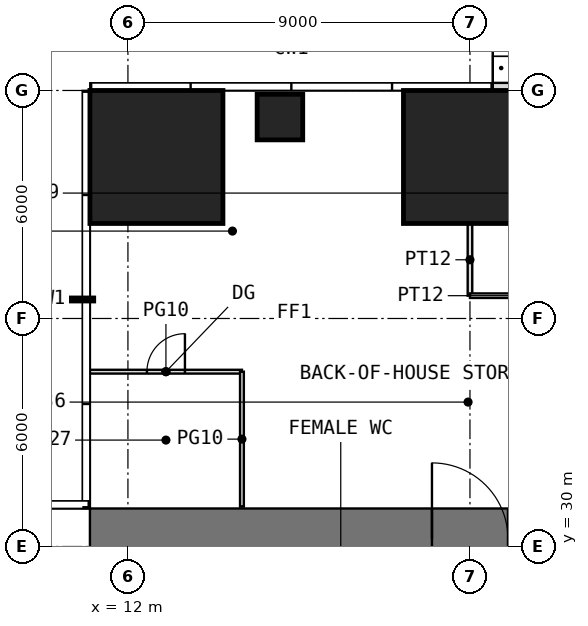
"""IFC4 building model, lengths in metres.
Left out: names, types, materials, properties, quantities, classifications, styles, units other than length and angle.
Written with IfcOpenShell. Run it as: python <this file> out.ifc"""

import sys

from ifc_helpers import new_model, si_unit, direction, frame, frame_2d, origin, origin_2d, place, context, subcontext, project, spatial, rectangle, extrude, element, fill, save


model = new_model("IFC4")
c1 = context("Model", 3, precision=1e-05, world=origin(), true_north=direction((0.0, 1.0)))
c2 = subcontext(c1, "Body", "Model", "MODEL_VIEW")
j1 = project(units=[si_unit("LENGTHUNIT", "METRE"), si_unit("PLANEANGLEUNIT", "RADIAN")], contexts=[c1])
p1 = place(None, origin())
s1 = spatial("IfcSite", under=j1, at=p1, CompositionType="ELEMENT")
p2 = place(p1, origin())
s2 = spatial("IfcBuilding", under=s1, at=p2, CompositionType="ELEMENT")
p3 = place(p2, frame((0.0, 0.0, 96.5)))
s3 = spatial("IfcBuildingStorey", under=s2, at=p3, CompositionType="ELEMENT", Elevation=96.5)
p4 = place(p3, frame((12.75, 40.25, 0.0), z_axis=(0.0, 0.0, 1.0), x_axis=(1.0, 0.0, 0.0)))
e1 = element("IfcColumn", 1, at=p4, inside=s3, PredefinedType="COLUMN", context=c2, shape_type="SweptSolid", body=[
    extrude(rectangle(XDim=3.5, YDim=3.5, at=origin_2d()), origin(), (0.0, 0.0, 1.0), 4.0),
])
p5 = place(p3, frame((16.0, 41.3, 0.0), z_axis=(0.0, 0.0, 1.0), x_axis=(1.0, 0.0, 0.0)))
e2 = element("IfcColumn", 2, at=p5, inside=s3, PredefinedType="COLUMN", context=c2, shape_type="SweptSolid", body=[
    extrude(rectangle(XDim=1.2, YDim=1.2, at=origin_2d()), origin(), (0.0, 0.0, 1.0), 4.0),
])
p6 = place(p3, frame((21.0, 40.25, 0.0), z_axis=(0.0, 0.0, 1.0), x_axis=(1.0, 0.0, 0.0)))
e3 = element("IfcColumn", 3, at=p6, inside=s3, PredefinedType="COLUMN", context=c2, shape_type="SweptSolid", body=[
    extrude(rectangle(XDim=3.5, YDim=3.5, at=origin_2d()), origin(), (0.0, 0.0, 1.0), 4.0),
])
p7 = place(p3, frame((25.4, 42.1, 0.0), z_axis=(0.0, 0.0, 1.0), x_axis=(-1.0, 0.0, 0.0)))
e4 = element("IfcWall", 4, at=p7, inside=s3, PredefinedType="USERDEFINED", context=c2, shape_type="SweptSolid", body=[
    extrude(rectangle(XDim=3.8, YDim=0.2, at=frame_2d((1.9, 0.0))), origin(), (0.0, 0.0, 1.0), 3.75),
])
p8 = place(p7, frame((1.5, 0.0, 0.0)))
e5 = element("IfcOpeningElement", 5, at=p8, cuts=e4, PredefinedType="OPENING", context=c2, shape_type="SweptSolid", body=[
    extrude(rectangle(XDim=1.0, YDim=2.4, at=frame_2d((0.5, 1.2))), frame((0.0, 0.11, 0.0), z_axis=(0.0, -1.0, 0.0), x_axis=(1.0, 0.0, 0.0)), (0.0, 0.0, 1.0), 0.22),
])
p9 = place(p3, frame((11.0, 30.2, -0.05), z_axis=(0.0, 0.0, 1.0), x_axis=(1.0, 0.0, 0.0)))
e6 = element("IfcWall", 6, at=p9, inside=s3, PredefinedType="SHEAR", context=c2, shape_type="SweptSolid", body=[
    extrude(rectangle(XDim=20.0, YDim=1.6, at=frame_2d((10.0, 0.0))), origin(), (0.0, 0.0, 1.0), 4.0),
])
p10 = place(p9, frame((9.0, 0.0, 0.05)))
e7 = element("IfcOpeningElement", 7, at=p10, cuts=e6, PredefinedType="OPENING", context=c2, shape_type="SweptSolid", body=[
    extrude(rectangle(XDim=2.0, YDim=2.2, at=frame_2d((1.0, 1.1))), frame((0.0, 0.81, 0.0), z_axis=(0.0, -1.0, 0.0), x_axis=(1.0, 0.0, 0.0)), (0.0, 0.0, 1.0), 1.62),
])
p11 = place(p3, frame((11.0, 34.6, 0.0), z_axis=(0.0, 0.0, 1.0), x_axis=(1.0, 0.0, 0.0)))
e8 = element("IfcWall", 8, at=p11, inside=s3, PredefinedType="PARTITIONING", context=c2, shape_type="SweptSolid", body=[
    extrude(rectangle(XDim=4.0, YDim=0.1, at=frame_2d((2.0, 0.0))), origin(), (0.0, 0.0, 1.0), 3.75),
])
p12 = place(p11, frame((1.5, 0.0, 0.0)))
e9 = element("IfcOpeningElement", 9, at=p12, cuts=e8, PredefinedType="OPENING", context=c2, shape_type="SweptSolid", body=[
    extrude(rectangle(XDim=1.0, YDim=2.4, at=frame_2d((0.5, 1.2))), frame((0.0, 0.06, 0.0), z_axis=(0.0, -1.0, 0.0), x_axis=(1.0, 0.0, 0.0)), (0.0, 0.0, 1.0), 0.12),
])
p13 = place(p3, frame((15.0, 31.05, 0.0), z_axis=(0.0, 0.0, 1.0), x_axis=(0.0, 1.0, 0.0)))
e10 = element("IfcWall", 10, at=p13, inside=s3, PredefinedType="PARTITIONING", context=c2, shape_type="SweptSolid", body=[
    extrude(rectangle(XDim=3.55, YDim=0.1, at=frame_2d((1.775, 0.0))), origin(), (0.0, 0.0, 1.0), 3.75),
])
p14 = place(p3, frame((21.0, 36.6, 0.0), z_axis=(0.0, 0.0, 1.0), x_axis=(0.0, 1.0, 0.0)))
e11 = element("IfcWall", 11, at=p14, inside=s3, PredefinedType="PARTITIONING", context=c2, shape_type="SweptSolid", body=[
    extrude(rectangle(XDim=1.89, YDim=0.12, at=frame_2d((0.945, 0.0))), origin(), (0.0, 0.0, 1.0), 3.75),
])
p15 = place(p3, frame((21.0, 36.6, 0.0), z_axis=(0.0, 0.0, 1.0), x_axis=(1.0, 0.0, 0.0)))
e12 = element("IfcWall", 12, at=p15, inside=s3, PredefinedType="PARTITIONING", context=c2, shape_type="SweptSolid", body=[
    extrude(rectangle(XDim=5.0, YDim=0.12, at=frame_2d((2.5, 0.0))), origin(), (0.0, 0.0, 1.0), 3.75),
])
p16 = place(p15, frame((2.0, 0.0, 0.0)))
e13 = element("IfcOpeningElement", 13, at=p16, cuts=e12, PredefinedType="OPENING", context=c2, shape_type="SweptSolid", body=[
    extrude(rectangle(XDim=1.0, YDim=2.2, at=frame_2d((0.5, 1.1))), frame((0.0, 0.07, 0.0), z_axis=(0.0, -1.0, 0.0), x_axis=(1.0, 0.0, 0.0)), (0.0, 0.0, 1.0), 0.14),
])
p17 = place(p10, origin())
e14 = element("IfcDoor", 14, at=p17, inside=s3, OperationType="DOUBLE_DOOR_SINGLE_SWING", PredefinedType="DOOR", context=c2, shape_type="SweptSolid", body=[
    extrude(rectangle(XDim=2.0, YDim=2.2, at=frame_2d((1.0, 1.1))), frame((0.0, 0.025, 0.0), z_axis=(0.0, -1.0, 0.0), x_axis=(1.0, 0.0, 0.0)), (0.0, 0.0, 1.0), 0.05),
])
fill(e7, e14)
p18 = place(p12, origin())
e15 = element("IfcDoor", 15, at=p18, inside=s3, OperationType="SINGLE_SWING_RIGHT", PredefinedType="DOOR", context=c2, shape_type="SweptSolid", body=[
    extrude(rectangle(XDim=1.0, YDim=2.4, at=frame_2d((0.5, 1.2))), frame((0.0, 0.025, 0.0), z_axis=(0.0, -1.0, 0.0), x_axis=(1.0, 0.0, 0.0)), (0.0, 0.0, 1.0), 0.05),
])
fill(e9, e15)
save(model, sys.argv[1])
